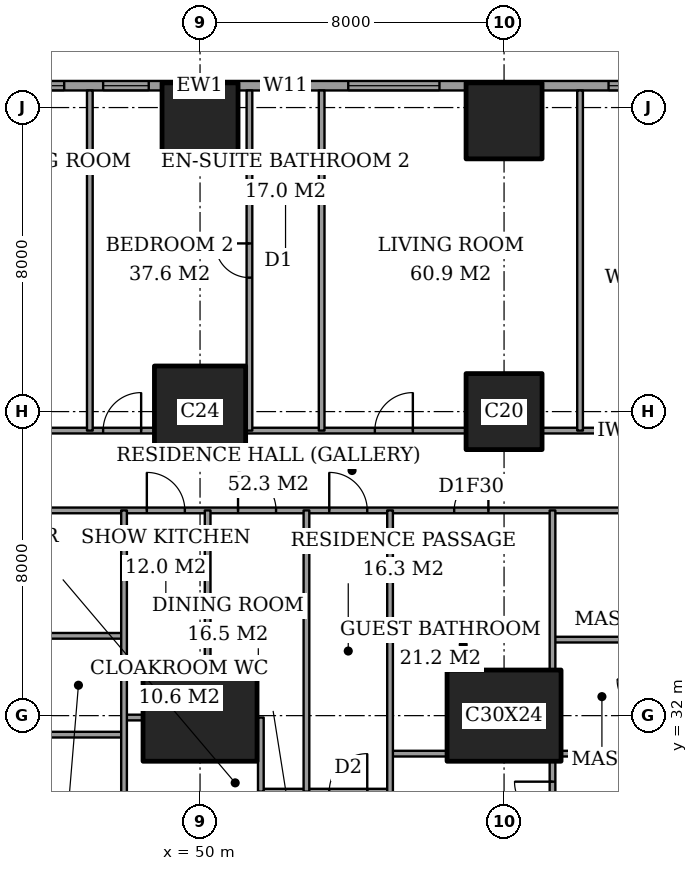
"""IFC4 building model, lengths in metres.
Left out: names, types, materials, properties, quantities, classifications, styles, units other than length and angle.
Written with IfcOpenShell. Run it as: python <this file> out.ifc"""

import sys

from ifc_helpers import new_model, si_unit, direction, frame, frame_2d, origin, origin_2d, place, context, subcontext, project, spatial, rectangle, extrude, element, fill, save


model = new_model("IFC4")
c1 = context("Model", 3, precision=1e-05, world=origin(), true_north=direction((0.0, 1.0)))
c2 = subcontext(c1, "Body", "Model", "MODEL_VIEW")
j1 = project(units=[si_unit("LENGTHUNIT", "METRE"), si_unit("PLANEANGLEUNIT", "RADIAN")], contexts=[c1])
p1 = place(None, origin())
s1 = spatial("IfcSite", under=j1, at=p1, CompositionType="ELEMENT")
p2 = place(p1, origin())
s2 = spatial("IfcBuilding", under=s1, at=p2, CompositionType="ELEMENT")
p3 = place(p2, frame((0.0, 0.0, 121.4)))
s3 = spatial("IfcBuildingStorey", under=s2, at=p3, CompositionType="ELEMENT", Elevation=121.4)
p4 = place(p3, frame((50.0, 32.0, 0.0), z_axis=(0.0, 0.0, 1.0), x_axis=(1.0, 0.0, 0.0)))
e1 = element("IfcColumn", 1, at=p4, inside=s3, PredefinedType="COLUMN", context=c2, shape_type="SweptSolid", body=[
    extrude(rectangle(XDim=3.0, YDim=2.4, at=origin_2d()), origin(), (0.0, 0.0, 1.0), 3.6),
])
p5 = place(p3, frame((50.0, 40.0, 0.0), z_axis=(0.0, 0.0, 1.0), x_axis=(1.0, 0.0, 0.0)))
e2 = element("IfcColumn", 2, at=p5, inside=s3, PredefinedType="COLUMN", context=c2, shape_type="SweptSolid", body=[
    extrude(rectangle(XDim=2.4, YDim=2.4, at=origin_2d()), origin(), (0.0, 0.0, 1.0), 3.6),
])
p6 = place(p3, frame((50.0, 47.65, 0.0), z_axis=(0.0, 0.0, 1.0), x_axis=(1.0, 0.0, 0.0)))
e3 = element("IfcColumn", 3, at=p6, inside=s3, PredefinedType="COLUMN", context=c2, shape_type="SweptSolid", body=[
    extrude(rectangle(XDim=2.0, YDim=2.0, at=origin_2d()), origin(), (0.0, 0.0, 1.0), 3.6),
])
p7 = place(p3, frame((58.0, 32.0, 0.0), z_axis=(0.0, 0.0, 1.0), x_axis=(1.0, 0.0, 0.0)))
e4 = element("IfcColumn", 4, at=p7, inside=s3, PredefinedType="COLUMN", context=c2, shape_type="SweptSolid", body=[
    extrude(rectangle(XDim=3.0, YDim=2.4, at=origin_2d()), origin(), (0.0, 0.0, 1.0), 3.6),
])
for number, where, z_axis, x_axis in (
    (5, (58.0, 40.0, 0.0), (0.0, 0.0, 1.0), (1.0, 0.0, 0.0)),
    (6, (58.0, 47.65, 0.0), (0.0, 0.0, 1.0), (1.0, 0.0, 0.0)),
):
    element("IfcColumn", number, at=place(p3, frame(where, z_axis=z_axis, x_axis=x_axis)), inside=s3, PredefinedType="COLUMN", context=c2, shape_type="SweptSolid", body=[
        extrude(rectangle(XDim=2.0, YDim=2.0, at=origin_2d()), origin(), (0.0, 0.0, 1.0), 3.6),
    ])
p8 = place(p3, frame((62.825, 48.575, 0.0), z_axis=(0.0, 0.0, 1.0), x_axis=(-1.0, 0.0, 0.0)))
e7 = element("IfcWall", 7, at=p8, inside=s3, PredefinedType="SOLIDWALL", context=c2, shape_type="SweptSolid", body=[
    extrude(rectangle(XDim=21.4, YDim=0.25, at=frame_2d((10.7, 0.0))), origin(), (0.0, 0.0, 1.0), 3.6),
])
p9 = place(p8, frame((0.875, 0.0, 0.4)))
e8 = element("IfcOpeningElement", 8, at=p9, cuts=e7, PredefinedType="OPENING", context=c2, shape_type="SweptSolid", body=[
    extrude(rectangle(XDim=1.2, YDim=2.2, at=frame_2d((0.6, 1.1))), frame((0.0, 0.135, 0.0), z_axis=(0.0, -1.0, 0.0), x_axis=(1.0, 0.0, 0.0)), (0.0, 0.0, 1.0), 0.27),
])
p10 = place(p8, frame((6.525, 0.0, 0.4)))
e9 = element("IfcOpeningElement", 9, at=p10, cuts=e7, PredefinedType="OPENING", context=c2, shape_type="SweptSolid", body=[
    extrude(rectangle(XDim=2.4, YDim=2.2, at=frame_2d((1.2, 1.1))), frame((0.0, 0.135, 0.0), z_axis=(0.0, -1.0, 0.0), x_axis=(1.0, 0.0, 0.0)), (0.0, 0.0, 1.0), 0.27),
])
p11 = place(p8, frame((9.975, 0.0, 0.4)))
e10 = element("IfcOpeningElement", 10, at=p11, cuts=e7, PredefinedType="OPENING", context=c2, shape_type="SweptSolid", body=[
    extrude(rectangle(XDim=1.2, YDim=2.2, at=frame_2d((0.6, 1.1))), frame((0.0, 0.135, 0.0), z_axis=(0.0, -1.0, 0.0), x_axis=(1.0, 0.0, 0.0)), (0.0, 0.0, 1.0), 0.27),
])
p12 = place(p8, frame((14.175, 0.0, 0.4)))
e11 = element("IfcOpeningElement", 11, at=p12, cuts=e7, PredefinedType="OPENING", context=c2, shape_type="SweptSolid", body=[
    extrude(rectangle(XDim=1.2, YDim=2.2, at=frame_2d((0.6, 1.1))), frame((0.0, 0.135, 0.0), z_axis=(0.0, -1.0, 0.0), x_axis=(1.0, 0.0, 0.0)), (0.0, 0.0, 1.0), 0.27),
])
p13 = place(p8, frame((16.4, 0.0, 0.4)))
e12 = element("IfcOpeningElement", 12, at=p13, cuts=e7, PredefinedType="OPENING", context=c2, shape_type="SweptSolid", body=[
    extrude(rectangle(XDim=2.4, YDim=2.2, at=frame_2d((1.2, 1.1))), frame((0.0, 0.135, 0.0), z_axis=(0.0, -1.0, 0.0), x_axis=(1.0, 0.0, 0.0)), (0.0, 0.0, 1.0), 0.27),
])
p14 = place(p3, frame((51.6, 30.0, 0.0), z_axis=(0.0, 0.0, 1.0), x_axis=(1.0, 0.0, 0.0)))
e13 = element("IfcWall", 13, at=p14, inside=s3, PredefinedType="PARTITIONING", context=c2, shape_type="SweptSolid", body=[
    extrude(rectangle(XDim=3.4, YDim=0.15, at=frame_2d((1.7, 0.0))), origin(), (0.0, 0.0, 1.0), 3.35),
])
p15 = place(p14, frame((1.8, 0.0, 0.0)))
e14 = element("IfcOpeningElement", 14, at=p15, cuts=e13, PredefinedType="OPENING", context=c2, shape_type="SweptSolid", body=[
    extrude(rectangle(XDim=1.0, YDim=2.1, at=frame_2d((0.5, 1.05))), frame((0.0, 0.085, 0.0), z_axis=(0.0, -1.0, 0.0), x_axis=(1.0, 0.0, 0.0)), (0.0, 0.0, 1.0), 0.17),
])
p16 = place(p3, frame((55.0, 31.0, 0.0), z_axis=(0.0, 0.0, 1.0), x_axis=(1.0, 0.0, 0.0)))
e15 = element("IfcWall", 15, at=p16, inside=s3, PredefinedType="PARTITIONING", context=c2, shape_type="SweptSolid", body=[
    extrude(rectangle(XDim=1.5, YDim=0.15, at=frame_2d((0.75, 0.0))), origin(), (0.0, 0.0, 1.0), 3.35),
])
p17 = place(p3, frame((59.5, 31.0, 0.0), z_axis=(0.0, 0.0, 1.0), x_axis=(1.0, 0.0, 0.0)))
e16 = element("IfcWall", 16, at=p17, inside=s3, PredefinedType="PARTITIONING", context=c2, shape_type="SweptSolid", body=[
    extrude(rectangle(XDim=5.15, YDim=0.15, at=frame_2d((2.575, 0.0))), origin(), (0.0, 0.0, 1.0), 3.35),
])
p18 = place(p3, frame((42.0, 31.5, 0.0), z_axis=(0.0, 0.0, 1.0), x_axis=(1.0, 0.0, 0.0)))
e17 = element("IfcWall", 17, at=p18, inside=s3, PredefinedType="PARTITIONING", context=c2, shape_type="SweptSolid", body=[
    extrude(rectangle(XDim=6.0, YDim=0.15, at=frame_2d((3.0, 0.0))), origin(), (0.0, 0.0, 1.0), 3.35),
])
p19 = place(p3, frame((48.0, 31.95, 0.0), z_axis=(0.0, 0.0, 1.0), x_axis=(1.0, 0.0, 0.0)))
e18 = element("IfcWall", 18, at=p19, inside=s3, PredefinedType="PARTITIONING", context=c2, shape_type="SweptSolid", body=[
    extrude(rectangle(XDim=0.5, YDim=0.15, at=frame_2d((0.25, 0.0))), origin(), (0.0, 0.0, 1.0), 2.634),
])
p20 = place(p3, frame((59.275, 34.0, 0.0), z_axis=(0.0, 0.0, 1.0), x_axis=(1.0, 0.0, 0.0)))
e19 = element("IfcWall", 19, at=p20, inside=s3, PredefinedType="PARTITIONING", context=c2, shape_type="SweptSolid", body=[
    extrude(rectangle(XDim=2.6, YDim=0.15, at=frame_2d((1.3, 0.0))), origin(), (0.0, 0.0, 1.0), 3.35),
])
p21 = place(p3, frame((45.6, 34.1, 0.0), z_axis=(0.0, 0.0, 1.0), x_axis=(1.0, 0.0, 0.0)))
e20 = element("IfcWall", 20, at=p21, inside=s3, PredefinedType="PARTITIONING", context=c2, shape_type="SweptSolid", body=[
    extrude(rectangle(XDim=2.4, YDim=0.15, at=frame_2d((1.2, 0.0))), origin(), (0.0, 0.0, 1.0), 3.35),
])
p22 = place(p3, frame((41.439, 37.4, 0.0), z_axis=(0.0, 0.0, 1.0), x_axis=(1.0, 0.0, 0.0)))
e21 = element("IfcWall", 21, at=p22, inside=s3, PredefinedType="PARTITIONING", context=c2, shape_type="SweptSolid", body=[
    extrude(rectangle(XDim=25.011, YDim=0.15, at=frame_2d((12.505, 0.0))), origin(), (0.0, 0.0, 1.0), 3.35),
])
p23 = place(p22, frame((11.961, 0.0, 0.0)))
e22 = element("IfcOpeningElement", 22, at=p23, cuts=e21, PredefinedType="OPENING", context=c2, shape_type="SweptSolid", body=[
    extrude(rectangle(XDim=1.0, YDim=2.1, at=frame_2d((0.5, 1.05))), frame((0.0, 0.085, 0.0), z_axis=(0.0, -1.0, 0.0), x_axis=(1.0, 0.0, 0.0)), (0.0, 0.0, 1.0), 0.17),
])
p24 = place(p22, frame((20.924, 0.0, 0.0)))
e23 = element("IfcOpeningElement", 23, at=p24, cuts=e21, PredefinedType="OPENING", context=c2, shape_type="SweptSolid", body=[
    extrude(rectangle(XDim=1.0, YDim=2.1, at=frame_2d((0.5, 1.05))), frame((0.0, 0.085, 0.0), z_axis=(0.0, -1.0, 0.0), x_axis=(1.0, 0.0, 0.0)), (0.0, 0.0, 1.0), 0.17),
])
p25 = place(p22, frame((15.249, 0.0, 0.0)))
e24 = element("IfcOpeningElement", 24, at=p25, cuts=e21, PredefinedType="OPENING", context=c2, shape_type="SweptSolid", body=[
    extrude(rectangle(XDim=0.9, YDim=2.1, at=frame_2d((0.45, 1.05))), frame((0.0, 0.085, 0.0), z_axis=(0.0, -1.0, 0.0), x_axis=(1.0, 0.0, 0.0)), (0.0, 0.0, 1.0), 0.17),
])
p26 = place(p22, frame((9.561, 0.0, 0.0)))
e25 = element("IfcOpeningElement", 25, at=p26, cuts=e21, PredefinedType="OPENING", context=c2, shape_type="SweptSolid", body=[
    extrude(rectangle(XDim=1.0, YDim=2.1, at=frame_2d((0.5, 1.05))), frame((0.0, 0.085, 0.0), z_axis=(0.0, -1.0, 0.0), x_axis=(1.0, 0.0, 0.0)), (0.0, 0.0, 1.0), 0.17),
])
p27 = place(p22, frame((7.161, 0.0, 0.0)))
e26 = element("IfcOpeningElement", 26, at=p27, cuts=e21, PredefinedType="OPENING", context=c2, shape_type="SweptSolid", body=[
    extrude(rectangle(XDim=1.0, YDim=2.1, at=frame_2d((0.5, 1.05))), frame((0.0, 0.085, 0.0), z_axis=(0.0, -1.0, 0.0), x_axis=(1.0, 0.0, 0.0)), (0.0, 0.0, 1.0), 0.17),
])
p28 = place(p22, frame((2.836, 0.0, 0.0)))
e27 = element("IfcOpeningElement", 27, at=p28, cuts=e21, PredefinedType="OPENING", context=c2, shape_type="SweptSolid", body=[
    extrude(rectangle(XDim=1.0, YDim=2.1, at=frame_2d((0.5, 1.05))), frame((0.0, 0.085, 0.0), z_axis=(0.0, -1.0, 0.0), x_axis=(1.0, 0.0, 0.0)), (0.0, 0.0, 1.0), 0.17),
])
p29 = place(p3, frame((43.35, 39.5, 0.0), z_axis=(0.0, 0.0, 1.0), x_axis=(1.0, 0.0, 0.0)))
e28 = element("IfcWall", 28, at=p29, inside=s3, PredefinedType="PARTITIONING", context=c2, shape_type="SweptSolid", body=[
    extrude(rectangle(XDim=5.45, YDim=0.15, at=frame_2d((2.725, 0.0))), origin(), (0.0, 0.0, 1.0), 3.35),
])
p30 = place(p29, frame((4.1, 0.0, 0.0)))
e29 = element("IfcOpeningElement", 29, at=p30, cuts=e28, PredefinedType="OPENING", context=c2, shape_type="SweptSolid", body=[
    extrude(rectangle(XDim=1.0, YDim=2.1, at=frame_2d((0.5, 1.05))), frame((0.0, 0.085, 0.0), z_axis=(0.0, -1.0, 0.0), x_axis=(1.0, 0.0, 0.0)), (0.0, 0.0, 1.0), 0.17),
])
p31 = place(p29, frame((1.375, 0.0, 0.0)))
e30 = element("IfcOpeningElement", 30, at=p31, cuts=e28, PredefinedType="OPENING", context=c2, shape_type="SweptSolid", body=[
    extrude(rectangle(XDim=1.0, YDim=2.1, at=frame_2d((0.5, 1.05))), frame((0.0, 0.085, 0.0), z_axis=(0.0, -1.0, 0.0), x_axis=(1.0, 0.0, 0.0)), (0.0, 0.0, 1.0), 0.17),
])
p32 = place(p3, frame((51.2, 39.5, 0.0), z_axis=(0.0, 0.0, 1.0), x_axis=(1.0, 0.0, 0.0)))
e31 = element("IfcWall", 31, at=p32, inside=s3, PredefinedType="PARTITIONING", context=c2, shape_type="SweptSolid", body=[
    extrude(rectangle(XDim=5.8, YDim=0.15, at=frame_2d((2.9, 0.0))), origin(), (0.0, 0.0, 1.0), 3.35),
])
p33 = place(p32, frame((3.4, 0.0, 0.0)))
e32 = element("IfcOpeningElement", 32, at=p33, cuts=e31, PredefinedType="OPENING", context=c2, shape_type="SweptSolid", body=[
    extrude(rectangle(XDim=1.0, YDim=2.1, at=frame_2d((0.5, 1.05))), frame((0.0, 0.085, 0.0), z_axis=(0.0, -1.0, 0.0), x_axis=(1.0, 0.0, 0.0)), (0.0, 0.0, 1.0), 0.17),
])
p34 = place(p3, frame((59.0, 39.5, 0.0), z_axis=(0.0, 0.0, 1.0), x_axis=(1.0, 0.0, 0.0)))
e33 = element("IfcWall", 33, at=p34, inside=s3, PredefinedType="PARTITIONING", context=c2, shape_type="SweptSolid", body=[
    extrude(rectangle(XDim=5.65, YDim=0.15, at=frame_2d((2.825, 0.0))), origin(), (0.0, 0.0, 1.0), 3.35),
])
p35 = place(p34, frame((2.825, 0.0, 0.0)))
e34 = element("IfcOpeningElement", 34, at=p35, cuts=e33, PredefinedType="OPENING", context=c2, shape_type="SweptSolid", body=[
    extrude(rectangle(XDim=1.0, YDim=2.1, at=frame_2d((0.5, 1.05))), frame((0.0, 0.085, 0.0), z_axis=(0.0, -1.0, 0.0), x_axis=(1.0, 0.0, 0.0)), (0.0, 0.0, 1.0), 0.17),
])
p36 = place(p3, frame((47.1, 39.5, 0.0), z_axis=(0.0, 0.0, 1.0), x_axis=(0.0, 1.0, 0.0)))
e35 = element("IfcWall", 35, at=p36, inside=s3, PredefinedType="PARTITIONING", context=c2, shape_type="SweptSolid", body=[
    extrude(rectangle(XDim=8.95, YDim=0.15, at=frame_2d((4.475, 0.0))), origin(), (0.0, 0.0, 1.0), 3.35),
])
p37 = place(p3, frame((48.0, 28.0, 0.0), z_axis=(0.0, 0.0, 1.0), x_axis=(0.0, 1.0, 0.0)))
e36 = element("IfcWall", 36, at=p37, inside=s3, PredefinedType="PARTITIONING", context=c2, shape_type="SweptSolid", body=[
    extrude(rectangle(XDim=9.4, YDim=0.15, at=frame_2d((4.7, 0.0))), origin(), (0.0, 0.0, 1.0), 3.35),
])
p38 = place(p37, frame((0.5, 0.0, 0.0)))
e37 = element("IfcOpeningElement", 37, at=p38, cuts=e36, PredefinedType="OPENING", context=c2, shape_type="SweptSolid", body=[
    extrude(rectangle(XDim=1.0, YDim=2.1, at=frame_2d((0.5, 1.05))), frame((0.0, 0.085, 0.0), z_axis=(0.0, -1.0, 0.0), x_axis=(1.0, 0.0, 0.0)), (0.0, 0.0, 1.0), 0.17),
])
p39 = place(p3, frame((50.2, 33.2, 0.0), z_axis=(0.0, 0.0, 1.0), x_axis=(0.0, 1.0, 0.0)))
e38 = element("IfcWall", 38, at=p39, inside=s3, PredefinedType="PARTITIONING", context=c2, shape_type="SweptSolid", body=[
    extrude(rectangle(XDim=4.2, YDim=0.15, at=frame_2d((2.1, 0.0))), origin(), (0.0, 0.0, 1.0), 3.35),
])
p40 = place(p3, frame((51.3, 39.5, 0.0), z_axis=(0.0, 0.0, 1.0), x_axis=(0.0, 1.0, 0.0)))
e39 = element("IfcWall", 39, at=p40, inside=s3, PredefinedType="PARTITIONING", context=c2, shape_type="SweptSolid", body=[
    extrude(rectangle(XDim=8.95, YDim=0.15, at=frame_2d((4.475, 0.0))), origin(), (0.0, 0.0, 1.0), 3.35),
])
p41 = place(p40, frame((4.025, 0.0, 0.0)))
e40 = element("IfcOpeningElement", 40, at=p41, cuts=e39, PredefinedType="OPENING", context=c2, shape_type="SweptSolid", body=[
    extrude(rectangle(XDim=0.9, YDim=2.1, at=frame_2d((0.45, 1.05))), frame((0.0, 0.085, 0.0), z_axis=(0.0, -1.0, 0.0), x_axis=(1.0, 0.0, 0.0)), (0.0, 0.0, 1.0), 0.17),
])
p42 = place(p3, frame((51.6, 30.0, 0.0), z_axis=(0.0, 0.0, 1.0), x_axis=(0.0, 1.0, 0.0)))
e41 = element("IfcWall", 41, at=p42, inside=s3, PredefinedType="PARTITIONING", context=c2, shape_type="SweptSolid", body=[
    extrude(rectangle(XDim=1.95, YDim=0.15, at=frame_2d((0.975, 0.0))), origin(), (0.0, 0.0, 1.0), 3.35),
])
p43 = place(p3, frame((52.8, 30.0, 0.0), z_axis=(0.0, 0.0, 1.0), x_axis=(0.0, 1.0, 0.0)))
e42 = element("IfcWall", 42, at=p43, inside=s3, PredefinedType="PARTITIONING", context=c2, shape_type="SweptSolid", body=[
    extrude(rectangle(XDim=7.4, YDim=0.15, at=frame_2d((3.7, 0.0))), origin(), (0.0, 0.0, 1.0), 3.35),
])
p44 = place(p3, frame((53.2, 39.5, 0.0), z_axis=(0.0, 0.0, 1.0), x_axis=(0.0, 1.0, 0.0)))
e43 = element("IfcWall", 43, at=p44, inside=s3, PredefinedType="PARTITIONING", context=c2, shape_type="SweptSolid", body=[
    extrude(rectangle(XDim=8.95, YDim=0.15, at=frame_2d((4.475, 0.0))), origin(), (0.0, 0.0, 1.0), 3.35),
])
p45 = place(p3, frame((55.0, 28.0, 0.0), z_axis=(0.0, 0.0, 1.0), x_axis=(0.0, 1.0, 0.0)))
e44 = element("IfcWall", 44, at=p45, inside=s3, PredefinedType="PARTITIONING", context=c2, shape_type="SweptSolid", body=[
    extrude(rectangle(XDim=9.4, YDim=0.15, at=frame_2d((4.7, 0.0))), origin(), (0.0, 0.0, 1.0), 3.35),
])
p46 = place(p45, frame((0.5, 0.0, 0.0)))
e45 = element("IfcOpeningElement", 45, at=p46, cuts=e44, PredefinedType="OPENING", context=c2, shape_type="SweptSolid", body=[
    extrude(rectangle(XDim=1.0, YDim=2.1, at=frame_2d((0.5, 1.05))), frame((0.0, 0.085, 0.0), z_axis=(0.0, -1.0, 0.0), x_axis=(1.0, 0.0, 0.0)), (0.0, 0.0, 1.0), 0.17),
])
p47 = place(p3, frame((59.275, 28.35, 0.0), z_axis=(0.0, 0.0, 1.0), x_axis=(0.0, 1.0, 0.0)))
e46 = element("IfcWall", 46, at=p47, inside=s3, PredefinedType="PARTITIONING", context=c2, shape_type="SweptSolid", body=[
    extrude(rectangle(XDim=2.45, YDim=0.15, at=frame_2d((1.225, 0.0))), origin(), (0.0, 0.0, 1.0), 3.35),
])
p48 = place(p47, frame((0.913, 0.0, 0.0)))
e47 = element("IfcOpeningElement", 47, at=p48, cuts=e46, PredefinedType="OPENING", context=c2, shape_type="SweptSolid", body=[
    extrude(rectangle(XDim=1.0, YDim=2.1, at=frame_2d((0.5, 1.05))), frame((0.0, 0.085, 0.0), z_axis=(0.0, -1.0, 0.0), x_axis=(1.0, 0.0, 0.0)), (0.0, 0.0, 1.0), 0.17),
])
p49 = place(p3, frame((59.275, 33.2, 0.0), z_axis=(0.0, 0.0, 1.0), x_axis=(0.0, 1.0, 0.0)))
e48 = element("IfcWall", 48, at=p49, inside=s3, PredefinedType="PARTITIONING", context=c2, shape_type="SweptSolid", body=[
    extrude(rectangle(XDim=4.2, YDim=0.15, at=frame_2d((2.1, 0.0))), origin(), (0.0, 0.0, 1.0), 3.35),
])
p50 = place(p3, frame((60.0, 39.5, 0.0), z_axis=(0.0, 0.0, 1.0), x_axis=(0.0, 1.0, 0.0)))
e49 = element("IfcWall", 49, at=p50, inside=s3, PredefinedType="PARTITIONING", context=c2, shape_type="SweptSolid", body=[
    extrude(rectangle(XDim=8.95, YDim=0.15, at=frame_2d((4.475, 0.0))), origin(), (0.0, 0.0, 1.0), 3.35),
])
p51 = place(p9, origin())
e50 = element("IfcWindow", 50, at=p51, inside=s3, PartitioningType="SINGLE_PANEL", PredefinedType="WINDOW", context=c2, shape_type="SweptSolid", body=[
    extrude(rectangle(XDim=1.2, YDim=2.2, at=frame_2d((0.6, 1.1))), frame((0.0, 0.03, 0.0), z_axis=(0.0, -1.0, 0.0), x_axis=(1.0, 0.0, 0.0)), (0.0, 0.0, 1.0), 0.06),
])
fill(e8, e50)
p52 = place(p10, origin())
e51 = element("IfcWindow", 51, at=p52, inside=s3, PartitioningType="SINGLE_PANEL", PredefinedType="WINDOW", context=c2, shape_type="SweptSolid", body=[
    extrude(rectangle(XDim=2.4, YDim=2.2, at=frame_2d((1.2, 1.1))), frame((0.0, 0.03, 0.0), z_axis=(0.0, -1.0, 0.0), x_axis=(1.0, 0.0, 0.0)), (0.0, 0.0, 1.0), 0.06),
])
fill(e9, e51)
p53 = place(p11, origin())
e52 = element("IfcWindow", 52, at=p53, inside=s3, PartitioningType="SINGLE_PANEL", PredefinedType="WINDOW", context=c2, shape_type="SweptSolid", body=[
    extrude(rectangle(XDim=1.2, YDim=2.2, at=frame_2d((0.6, 1.1))), frame((0.0, 0.03, 0.0), z_axis=(0.0, -1.0, 0.0), x_axis=(1.0, 0.0, 0.0)), (0.0, 0.0, 1.0), 0.06),
])
fill(e10, e52)
p54 = place(p12, origin())
e53 = element("IfcWindow", 53, at=p54, inside=s3, PartitioningType="SINGLE_PANEL", PredefinedType="WINDOW", context=c2, shape_type="SweptSolid", body=[
    extrude(rectangle(XDim=1.2, YDim=2.2, at=frame_2d((0.6, 1.1))), frame((0.0, 0.03, 0.0), z_axis=(0.0, -1.0, 0.0), x_axis=(1.0, 0.0, 0.0)), (0.0, 0.0, 1.0), 0.06),
])
fill(e11, e53)
p55 = place(p13, origin())
e54 = element("IfcWindow", 54, at=p55, inside=s3, PartitioningType="SINGLE_PANEL", PredefinedType="WINDOW", context=c2, shape_type="SweptSolid", body=[
    extrude(rectangle(XDim=2.4, YDim=2.2, at=frame_2d((1.2, 1.1))), frame((0.0, 0.03, 0.0), z_axis=(0.0, -1.0, 0.0), x_axis=(1.0, 0.0, 0.0)), (0.0, 0.0, 1.0), 0.06),
])
fill(e12, e54)
p56 = place(p33, origin())
e55 = element("IfcDoor", 55, at=p56, inside=s3, OperationType="SINGLE_SWING_LEFT", PredefinedType="DOOR", context=c2, shape_type="SweptSolid", body=[
    extrude(rectangle(XDim=1.0, YDim=2.1, at=frame_2d((0.5, 1.05))), frame((0.0, 0.025, 0.0), z_axis=(0.0, -1.0, 0.0), x_axis=(1.0, 0.0, 0.0)), (0.0, 0.0, 1.0), 0.05),
])
fill(e32, e55)
p57 = place(p41, origin())
e56 = element("IfcDoor", 56, at=p57, inside=s3, OperationType="SINGLE_SWING_LEFT", PredefinedType="DOOR", context=c2, shape_type="SweptSolid", body=[
    extrude(rectangle(XDim=0.9, YDim=2.1, at=frame_2d((0.45, 1.05))), frame((0.0, 0.025, 0.0), z_axis=(0.0, -1.0, 0.0), x_axis=(1.0, 0.0, 0.0)), (0.0, 0.0, 1.0), 0.05),
])
fill(e40, e56)
p58 = place(p30, origin())
e57 = element("IfcDoor", 57, at=p58, inside=s3, OperationType="SINGLE_SWING_LEFT", PredefinedType="DOOR", context=c2, shape_type="SweptSolid", body=[
    extrude(rectangle(XDim=1.0, YDim=2.1, at=frame_2d((0.5, 1.05))), frame((0.0, 0.025, 0.0), z_axis=(0.0, -1.0, 0.0), x_axis=(1.0, 0.0, 0.0)), (0.0, 0.0, 1.0), 0.05),
])
fill(e29, e57)
p59 = place(p23, origin())
e58 = element("IfcDoor", 58, at=p59, inside=s3, OperationType="SINGLE_SWING_RIGHT", PredefinedType="DOOR", context=c2, shape_type="SweptSolid", body=[
    extrude(rectangle(XDim=1.0, YDim=2.1, at=frame_2d((0.5, 1.05))), frame((0.0, 0.025, 0.0), z_axis=(0.0, -1.0, 0.0), x_axis=(1.0, 0.0, 0.0)), (0.0, 0.0, 1.0), 0.05),
])
fill(e22, e58)
p60 = place(p48, origin())
e59 = element("IfcDoor", 59, at=p60, inside=s3, OperationType="SINGLE_SWING_LEFT", PredefinedType="DOOR", context=c2, shape_type="SweptSolid", body=[
    extrude(rectangle(XDim=1.0, YDim=2.1, at=frame_2d((0.5, 1.05))), frame((0.0, 0.025, 0.0), z_axis=(0.0, -1.0, 0.0), x_axis=(1.0, 0.0, 0.0)), (0.0, 0.0, 1.0), 0.05),
])
fill(e47, e59)
p61 = place(p25, origin())
e60 = element("IfcDoor", 60, at=p61, inside=s3, OperationType="SINGLE_SWING_LEFT", PredefinedType="DOOR", context=c2, shape_type="SweptSolid", body=[
    extrude(rectangle(XDim=0.9, YDim=2.1, at=frame_2d((0.45, 1.05))), frame((0.0, 0.025, 0.0), z_axis=(0.0, -1.0, 0.0), x_axis=(1.0, 0.0, 0.0)), (0.0, 0.0, 1.0), 0.05),
])
fill(e24, e60)
p62 = place(p15, origin())
e61 = element("IfcDoor", 61, at=p62, inside=s3, OperationType="SINGLE_SWING_LEFT", PredefinedType="DOOR", context=c2, shape_type="SweptSolid", body=[
    extrude(rectangle(XDim=1.0, YDim=2.1, at=frame_2d((0.5, 1.05))), frame((0.0, 0.025, 0.0), z_axis=(0.0, -1.0, 0.0), x_axis=(1.0, 0.0, 0.0)), (0.0, 0.0, 1.0), 0.05),
])
fill(e14, e61)
p63 = place(p26, origin())
e62 = element("IfcDoor", 62, at=p63, inside=s3, OperationType="SINGLE_SWING_RIGHT", PredefinedType="DOOR", context=c2, shape_type="SweptSolid", body=[
    extrude(rectangle(XDim=1.0, YDim=2.1, at=frame_2d((0.5, 1.05))), frame((0.0, 0.025, 0.0), z_axis=(0.0, -1.0, 0.0), x_axis=(1.0, 0.0, 0.0)), (0.0, 0.0, 1.0), 0.05),
])
fill(e25, e62)
p64 = place(p27, origin())
e63 = element("IfcDoor", 63, at=p64, inside=s3, OperationType="SINGLE_SWING_RIGHT", PredefinedType="DOOR", context=c2, shape_type="SweptSolid", body=[
    extrude(rectangle(XDim=1.0, YDim=2.1, at=frame_2d((0.5, 1.05))), frame((0.0, 0.025, 0.0), z_axis=(0.0, -1.0, 0.0), x_axis=(1.0, 0.0, 0.0)), (0.0, 0.0, 1.0), 0.05),
])
fill(e26, e63)
save(model, sys.argv[1])
